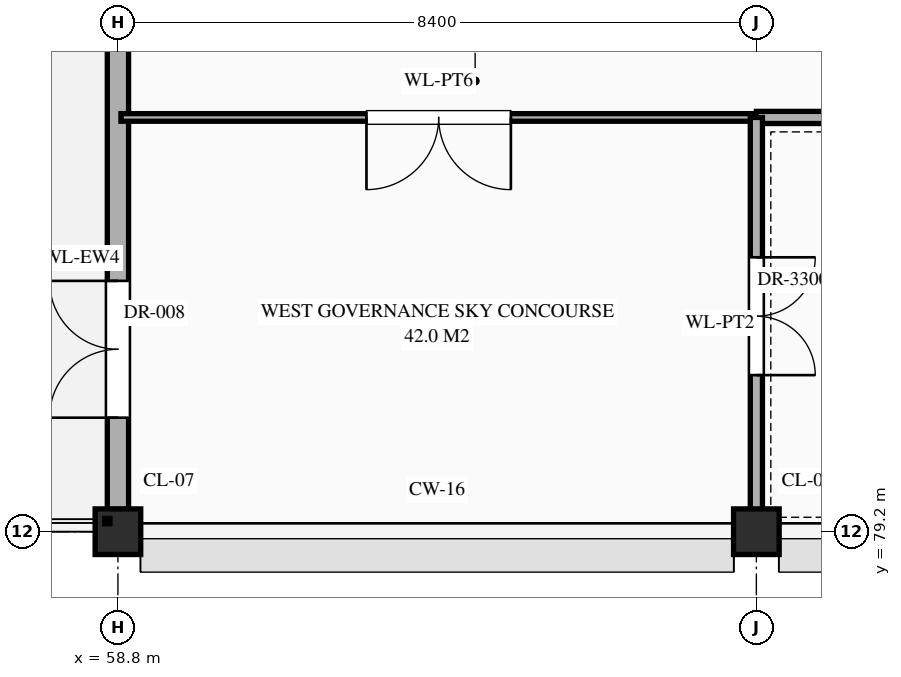
"""IFC4 building model, lengths in metres.
Left out: names, types, materials, properties, quantities, classifications, styles, units other than length and angle.
Written with IfcOpenShell. Run it as: python <this file> out.ifc"""

import sys

from ifc_helpers import new_model, si_unit, direction, frame, frame_2d, origin, origin_2d, place, context, subcontext, project, spatial, rectangle, extrude, element, fill, save


model = new_model("IFC4")
c1 = context("Model", 3, precision=1e-05, world=origin(), true_north=direction((0.0, 1.0)))
c2 = subcontext(c1, "Body", "Model", "MODEL_VIEW")
j1 = project(units=[si_unit("LENGTHUNIT", "METRE"), si_unit("PLANEANGLEUNIT", "RADIAN")], contexts=[c1])
p1 = place(None, origin())
s1 = spatial("IfcSite", under=j1, at=p1, CompositionType="ELEMENT")
p2 = place(p1, origin())
s2 = spatial("IfcBuilding", under=s1, at=p2, CompositionType="ELEMENT")
p3 = place(p2, frame((0.0, 0.0, 60.3)))
s3 = spatial("IfcBuildingStorey", under=s2, at=p3, CompositionType="ELEMENT", Elevation=60.3)
for number, where, z_axis, x_axis in (
    (1, (58.8, 79.2, 0.0), (0.0, 0.0, 1.0), (1.0, 0.0, 0.0)),
    (2, (67.2, 79.2, 0.0), (0.0, 0.0, 1.0), (1.0, 0.0, 0.0)),
):
    element("IfcColumn", number, at=place(p3, frame(where, z_axis=z_axis, x_axis=x_axis)), inside=s3, PredefinedType="COLUMN", context=c2, shape_type="SweptSolid", body=[
        extrude(rectangle(XDim=0.6, YDim=0.6, at=origin_2d()), origin(), (0.0, 0.0, 1.0), 4.2),
    ])
p4 = place(p3, frame((58.8, 79.495, 0.0), z_axis=(0.0, 0.0, 1.0), x_axis=(0.0, 1.0, 0.0)))
e3 = element("IfcWall", 3, at=p4, inside=s3, PredefinedType="STANDARD", context=c2, shape_type="SweptSolid", body=[
    extrude(rectangle(XDim=6.61, YDim=0.28, at=frame_2d((3.305, 0.0))), origin(), (0.0, 0.0, 1.0), 3.31),
])
p5 = place(p4, frame((1.205, 0.0, 0.0)))
e4 = element("IfcOpeningElement", 4, at=p5, cuts=e3, PredefinedType="OPENING", context=c2, shape_type="SweptSolid", body=[
    extrude(rectangle(XDim=1.8, YDim=2.25, at=frame_2d((0.9, 1.125))), frame((0.0, 0.152, 0.0), z_axis=(0.0, -1.0, 0.0), x_axis=(1.0, 0.0, 0.0)), (0.0, 0.0, 1.0), 0.304),
])
p6 = place(p3, frame((58.84, 84.65, 0.0), z_axis=(0.0, 0.0, 1.0), x_axis=(1.0, 0.0, 0.0)))
e5 = element("IfcWall", 5, at=p6, inside=s3, PredefinedType="STANDARD", context=c2, shape_type="SweptSolid", body=[
    extrude(rectangle(XDim=8.36, YDim=0.1, at=frame_2d((4.18, 0.0))), origin(), (0.0, 0.0, 1.0), 3.96),
])
p7 = place(p6, frame((3.23, 0.0, 0.0)))
e6 = element("IfcOpeningElement", 6, at=p7, cuts=e5, PredefinedType="OPENING", context=c2, shape_type="SweptSolid", body=[
    extrude(rectangle(XDim=1.9, YDim=2.5, at=frame_2d((0.95, 1.25))), frame((0.0, 0.062, 0.0), z_axis=(0.0, -1.0, 0.0), x_axis=(1.0, 0.0, 0.0)), (0.0, 0.0, 1.0), 0.124),
])
p8 = place(p3, frame((67.2, 84.65, 0.0), z_axis=(0.0, 0.0, 1.0), x_axis=(1.0, 0.0, 0.0)))
e7 = element("IfcWall", 7, at=p8, inside=s3, PredefinedType="STANDARD", context=c2, shape_type="SweptSolid", body=[
    extrude(rectangle(XDim=16.8, YDim=0.16, at=frame_2d((8.4, 0.0))), origin(), (0.0, 0.0, 1.0), 3.96),
])
p9 = place(p8, frame((7.5, 0.0, 0.0)))
e8 = element("IfcOpeningElement", 8, at=p9, cuts=e7, PredefinedType="OPENING", context=c2, shape_type="SweptSolid", body=[
    extrude(rectangle(XDim=1.8, YDim=2.5, at=frame_2d((0.9, 1.25))), frame((0.0, 0.092, 0.0), z_axis=(0.0, -1.0, 0.0), x_axis=(1.0, 0.0, 0.0)), (0.0, 0.0, 1.0), 0.184),
])
p10 = place(p3, frame((67.2, 79.24, 0.0), z_axis=(0.0, 0.0, 1.0), x_axis=(0.0, 1.0, 0.0)))
e9 = element("IfcWall", 9, at=p10, inside=s3, PredefinedType="STANDARD", context=c2, shape_type="SweptSolid", body=[
    extrude(rectangle(XDim=5.41, YDim=0.16, at=frame_2d((2.705, 0.0))), origin(), (0.0, 0.0, 1.0), 3.21),
])
p11 = place(p10, frame((2.02, 0.0, 0.0)))
e10 = element("IfcOpeningElement", 10, at=p11, cuts=e9, PredefinedType="OPENING", context=c2, shape_type="SweptSolid", body=[
    extrude(rectangle(XDim=1.55, YDim=2.35, at=frame_2d((0.775, 1.175))), frame((0.0, 0.092, 0.0), z_axis=(0.0, -1.0, 0.0), x_axis=(1.0, 0.0, 0.0)), (0.0, 0.0, 1.0), 0.184),
])
p12 = place(p5, origin())
e11 = element("IfcDoor", 11, at=p12, inside=s3, OperationType="DOUBLE_DOOR_SINGLE_SWING", PredefinedType="DOOR", context=c2, shape_type="SweptSolid", body=[
    extrude(rectangle(XDim=1.8, YDim=2.25, at=frame_2d((0.9, 1.125))), frame((0.0, 0.025, 0.0), z_axis=(0.0, -1.0, 0.0), x_axis=(1.0, 0.0, 0.0)), (0.0, 0.0, 1.0), 0.05),
])
fill(e4, e11)
p13 = place(p7, frame((1.9, 0.0, 0.0), z_axis=(0.0, 0.0, 1.0), x_axis=(-1.0, 0.0, 0.0)))
e12 = element("IfcDoor", 12, at=p13, inside=s3, OperationType="DOUBLE_DOOR_SINGLE_SWING", PredefinedType="DOOR", context=c2, shape_type="SweptSolid", body=[
    extrude(rectangle(XDim=1.9, YDim=2.5, at=frame_2d((0.95, 1.25))), frame((0.0, 0.025, 0.0), z_axis=(0.0, -1.0, 0.0), x_axis=(1.0, 0.0, 0.0)), (0.0, 0.0, 1.0), 0.05),
])
fill(e6, e12)
p14 = place(p11, frame((1.55, 0.0, 0.0), z_axis=(0.0, 0.0, 1.0), x_axis=(-1.0, 0.0, 0.0)))
e13 = element("IfcDoor", 13, at=p14, inside=s3, OperationType="DOUBLE_DOOR_SINGLE_SWING", PredefinedType="DOOR", context=c2, shape_type="SweptSolid", body=[
    extrude(rectangle(XDim=1.55, YDim=2.35, at=frame_2d((0.775, 1.175))), frame((0.0, 0.025, 0.0), z_axis=(0.0, -1.0, 0.0), x_axis=(1.0, 0.0, 0.0)), (0.0, 0.0, 1.0), 0.05),
])
fill(e10, e13)
save(model, sys.argv[1])
